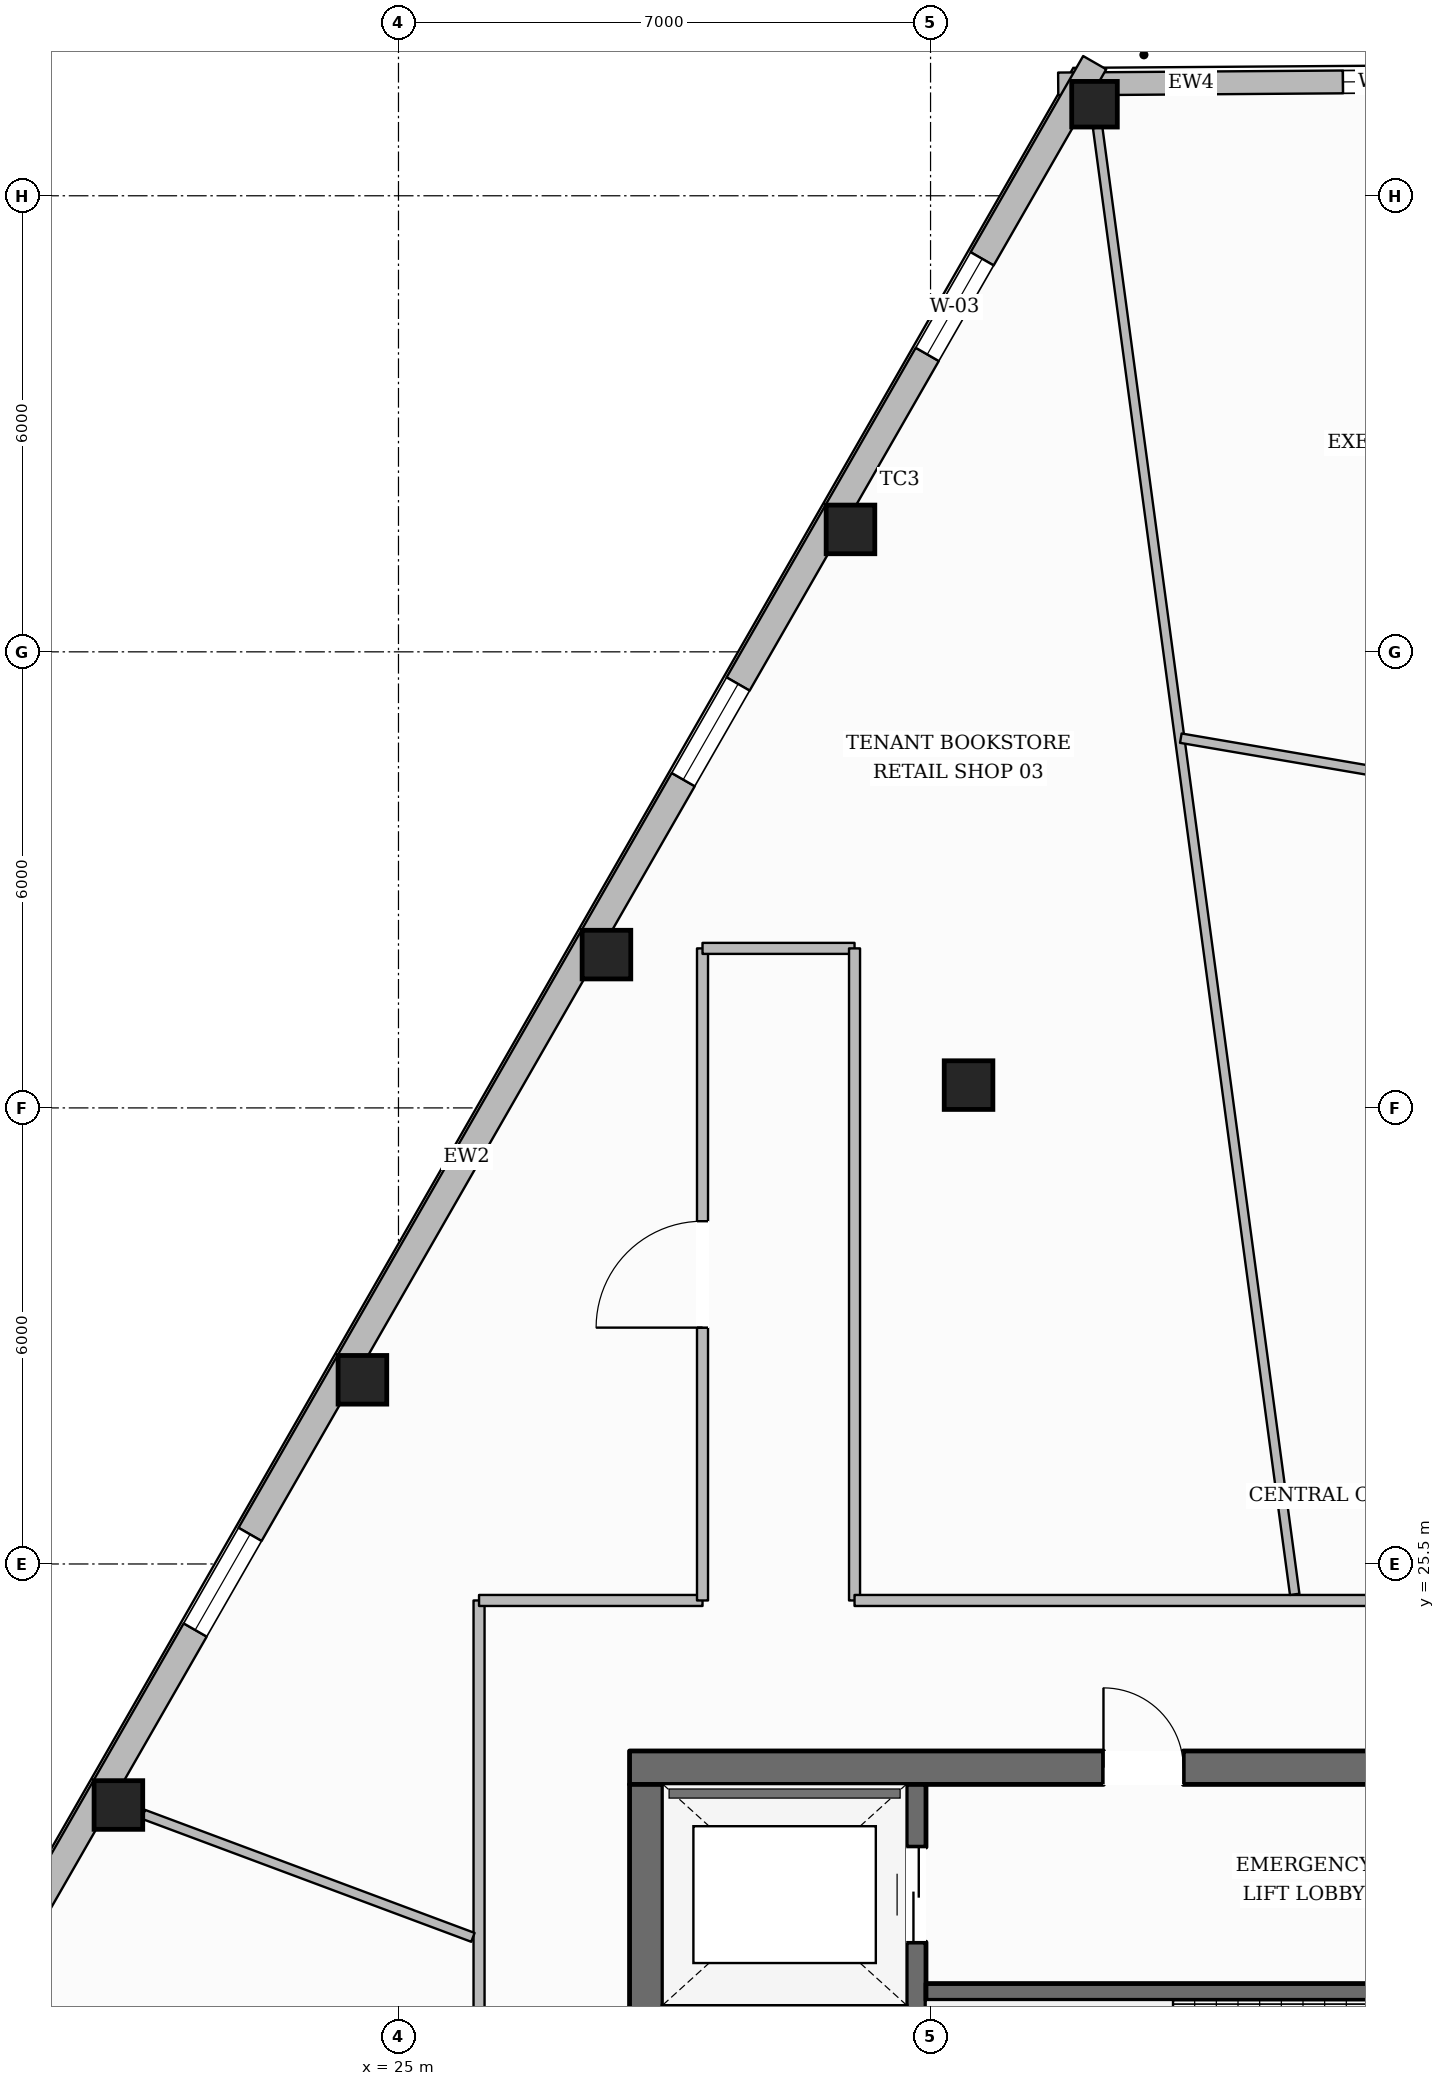
"""IFC4 building model, lengths in metres.
Left out: names, types, materials, properties, quantities, classifications, styles, units other than length and angle.
Written with IfcOpenShell. Run it as: python <this file> out.ifc"""

import sys

from ifc_helpers import new_model, si_unit, direction, frame, frame_2d, origin, origin_2d, place, context, subcontext, project, spatial, rectangle, hollow_rectangle, extrude, element, fill, save


model = new_model("IFC4")
c1 = context("Model", 3, precision=1e-05, world=origin(), true_north=direction((0.0, 1.0)))
c2 = subcontext(c1, "Body", "Model", "MODEL_VIEW")
j1 = project(units=[si_unit("LENGTHUNIT", "METRE"), si_unit("PLANEANGLEUNIT", "RADIAN")], contexts=[c1])
p1 = place(None, origin())
s1 = spatial("IfcSite", under=j1, at=p1, CompositionType="ELEMENT")
p2 = place(p1, origin())
s2 = spatial("IfcBuilding", under=s1, at=p2, CompositionType="ELEMENT")
p3 = place(p2, frame((0.0, 0.0, 226.6)))
s3 = spatial("IfcBuildingStorey", under=s2, at=p3, CompositionType="ELEMENT", Elevation=226.6)
p4 = place(p3, frame((28.04, 22.82, 0.0), z_axis=(0.0, 0.0, 1.0), x_axis=(1.0, 0.0, 0.0)))
e1 = element("IfcWall", 1, at=p4, inside=s3, PredefinedType="SOLIDWALL", context=c2, shape_type="SweptSolid", body=[
    extrude(rectangle(XDim=19.92, YDim=0.44, at=frame_2d((9.96, 0.0))), origin(), (0.0, 0.0, 1.0), 3.6),
])
p5 = place(p4, frame((6.235, 0.0, 0.0)))
e2 = element("IfcOpeningElement", 2, at=p5, cuts=e1, PredefinedType="OPENING", context=c2, shape_type="SweptSolid", body=[
    extrude(rectangle(XDim=1.05, YDim=2.15, at=frame_2d((0.525, 1.075))), frame((0.0, 0.23, 0.0), z_axis=(0.0, -1.0, 0.0), x_axis=(1.0, 0.0, 0.0)), (0.0, 0.0, 1.0), 0.46),
])
p6 = place(p4, frame((12.635, 0.0, 0.0)))
e3 = element("IfcOpeningElement", 3, at=p6, cuts=e1, PredefinedType="OPENING", context=c2, shape_type="SweptSolid", body=[
    extrude(rectangle(XDim=1.05, YDim=2.15, at=frame_2d((0.525, 1.075))), frame((0.0, 0.23, 0.0), z_axis=(0.0, -1.0, 0.0), x_axis=(1.0, 0.0, 0.0)), (0.0, 0.0, 1.0), 0.46),
])
p7 = place(p3, frame((28.26, 9.6, 0.0), z_axis=(0.0, 0.0, 1.0), x_axis=(0.0, 1.0, 0.0)))
e4 = element("IfcWall", 4, at=p7, inside=s3, PredefinedType="SOLIDWALL", context=c2, shape_type="SweptSolid", body=[
    extrude(rectangle(XDim=13.0, YDim=0.44, at=frame_2d((6.5, 0.0))), origin(), (0.0, 0.0, 1.0), 3.6),
])
p8 = place(p7, frame((0.2, 0.0, 0.0)))
e5 = element("IfcOpeningElement", 5, at=p8, cuts=e4, PredefinedType="OPENING", context=c2, shape_type="SweptSolid", body=[
    extrude(rectangle(XDim=1.1, YDim=2.15, at=frame_2d((0.55, 1.075))), frame((0.0, 0.23, 0.0), z_axis=(0.0, -1.0, 0.0), x_axis=(1.0, 0.0, 0.0)), (0.0, 0.0, 1.0), 0.46),
])
p9 = place(p7, frame((8.4, 0.0, 0.0)))
e6 = element("IfcOpeningElement", 6, at=p9, cuts=e4, PredefinedType="OPENING", context=c2, shape_type="SweptSolid", body=[
    extrude(rectangle(XDim=0.9, YDim=2.1, at=frame_2d((0.45, 1.05))), frame((0.0, 0.23, 0.0), z_axis=(0.0, -1.0, 0.0), x_axis=(1.0, 0.0, 0.0)), (0.0, 0.0, 1.0), 0.46),
])
p10 = place(p3, frame((31.81, 9.6, 0.0), z_axis=(0.0, 0.0, 1.0), x_axis=(0.0, 1.0, 0.0)))
e7 = element("IfcWall", 7, at=p10, inside=s3, PredefinedType="SHEAR", context=c2, shape_type="SweptSolid", body=[
    extrude(rectangle(XDim=13.0, YDim=0.26, at=frame_2d((6.5, 0.0))), origin(), (0.0, 0.0, 1.0), 3.6),
])
p11 = place(p10, frame((10.925, 0.0, 0.0)))
e8 = element("IfcOpeningElement", 8, at=p11, cuts=e7, PredefinedType="OPENING", context=c2, shape_type="SweptSolid", body=[
    extrude(rectangle(XDim=1.25, YDim=2.25, at=frame_2d((0.625, 1.125))), frame((0.0, 0.14, 0.0), z_axis=(0.0, -1.0, 0.0), x_axis=(1.0, 0.0, 0.0)), (0.0, 0.0, 1.0), 0.28),
])
p12 = place(p3, frame((28.48, 19.57, 0.0), z_axis=(0.0, 0.0, 1.0), x_axis=(1.0, 0.0, 0.0)))
e9 = element("IfcWall", 9, at=p12, inside=s3, PredefinedType="SHEAR", context=c2, shape_type="SweptSolid", body=[
    extrude(rectangle(XDim=3.2, YDim=0.26, at=frame_2d((1.6, 0.0))), origin(), (0.0, 0.0, 1.0), 3.6),
])
p13 = place(p3, frame((31.94, 19.87, 0.0), z_axis=(0.0, 0.0, 1.0), x_axis=(1.0, 0.0, 0.0)))
e10 = element("IfcWall", 10, at=p13, inside=s3, PredefinedType="SOLIDWALL", context=c2, shape_type="SweptSolid", body=[
    extrude(rectangle(XDim=12.12, YDim=0.22, at=frame_2d((6.06, 0.0))), origin(), (0.0, 0.0, 1.0), 3.6),
])
p14 = place(p13, frame((6.3, 0.0, 0.0)))
e11 = element("IfcOpeningElement", 11, at=p14, cuts=e10, PredefinedType="OPENING", context=c2, shape_type="SweptSolid", body=[
    extrude(rectangle(XDim=1.1, YDim=2.15, at=frame_2d((0.55, 1.075))), frame((0.0, 0.12, 0.0), z_axis=(0.0, -1.0, 0.0), x_axis=(1.0, 0.0, 0.0)), (0.0, 0.0, 1.0), 0.24),
])
p15 = place(p13, frame((8.23, 0.0, 0.0)))
e12 = element("IfcOpeningElement", 12, at=p15, cuts=e10, PredefinedType="OPENING", context=c2, shape_type="SweptSolid", body=[
    extrude(rectangle(XDim=0.9, YDim=2.1, at=frame_2d((0.45, 1.05))), frame((0.0, 0.12, 0.0), z_axis=(0.0, -1.0, 0.0), x_axis=(1.0, 0.0, 0.0)), (0.0, 0.0, 1.0), 0.24),
])
p16 = place(p13, frame((10.45, 0.0, 0.0)))
e13 = element("IfcOpeningElement", 13, at=p16, cuts=e10, PredefinedType="OPENING", context=c2, shape_type="SweptSolid", body=[
    extrude(rectangle(XDim=0.9, YDim=2.1, at=frame_2d((0.45, 1.05))), frame((0.0, 0.12, 0.0), z_axis=(0.0, -1.0, 0.0), x_axis=(1.0, 0.0, 0.0)), (0.0, 0.0, 1.0), 0.24),
])
p17 = place(p3, frame((34.157, 44.705, 0.0), z_axis=(0.0, 0.0, 1.0), x_axis=(1.0, 0.0, 0.0)))
e14 = element("IfcColumn", 14, at=p17, inside=s3, PredefinedType="COLUMN", context=c2, shape_type="SweptSolid", body=[
    extrude(hollow_rectangle(XDim=0.6, YDim=0.6, WallThickness=0.028, at=origin_2d()), origin(), (0.0, 0.0, 1.0), 3.6),
])
for number, where, z_axis, x_axis in (
    (15, (30.947, 39.111, 0.0), (0.0, 0.0, 1.0), (1.0, 0.0, 0.0)),
    (16, (27.736, 33.517, 0.0), (0.0, 0.0, 1.0), (1.0, 0.0, 0.0)),
    (17, (24.526, 27.923, 0.0), (0.0, 0.0, 1.0), (1.0, 0.0, 0.0)),
    (18, (21.315, 22.329, 0.0), (0.0, 0.0, 1.0), (1.0, 0.0, 0.0)),
    (19, (32.5, 31.8, 0.0), (0.0, 0.0, 1.0), (1.0, 0.0, 0.0)),
):
    element("IfcColumn", number, at=place(p3, frame(where, z_axis=z_axis, x_axis=x_axis)), inside=s3, PredefinedType="COLUMN", context=c2, shape_type="SweptSolid", body=[
        extrude(hollow_rectangle(XDim=0.64, YDim=0.64, WallThickness=0.028, at=origin_2d()), origin(), (0.0, 0.0, 1.0), 3.6),
    ])
p18 = place(p3, frame((33.679, 44.971, 0.0), z_axis=(0.0, 0.0, 1.0), x_axis=(0.999974684305, 0.007115528717, 0.0)))
e20 = element("IfcWall", 20, at=p18, inside=s3, PredefinedType="STANDARD", context=c2, shape_type="SweptSolid", body=[
    extrude(rectangle(XDim=8.543, YDim=0.3, at=frame_2d((4.272, 0.0))), origin(), (0.0, 0.0, 1.0), 3.132),
])
p19 = place(p18, frame((3.747, 0.0, 0.65)))
e21 = element("IfcOpeningElement", 21, at=p19, cuts=e20, PredefinedType="OPENING", context=c2, shape_type="SweptSolid", body=[
    extrude(rectangle(XDim=1.05, YDim=1.7, at=frame_2d((0.525, 0.85))), frame((0.0, 0.16, 0.0), z_axis=(0.0, -1.0, 0.0), x_axis=(1.0, 0.0, 0.0)), (0.0, 0.0, 1.0), 0.32),
])
p20 = place(p3, frame((14.425, 10.865, 0.0), z_axis=(0.0, 0.0, 1.0), x_axis=(0.497768108872, 0.867310157781, 0.0)))
e22 = element("IfcWall", 22, at=p20, inside=s3, PredefinedType="STANDARD", context=c2, shape_type="SweptSolid", body=[
    extrude(rectangle(XDim=39.647, YDim=0.35, at=frame_2d((19.823, 0.0))), origin(), (0.0, 0.0, 1.0), 3.132),
])
p21 = place(p20, frame((35.221, 0.0, 0.65)))
e23 = element("IfcOpeningElement", 23, at=p21, cuts=e22, PredefinedType="OPENING", context=c2, shape_type="SweptSolid", body=[
    extrude(rectangle(XDim=1.45, YDim=1.75, at=frame_2d((0.725, 0.875))), frame((0.0, 0.185, 0.0), z_axis=(0.0, -1.0, 0.0), x_axis=(1.0, 0.0, 0.0)), (0.0, 0.0, 1.0), 0.37),
])
p22 = place(p20, frame((28.771, 0.0, 0.65)))
e24 = element("IfcOpeningElement", 24, at=p22, cuts=e22, PredefinedType="OPENING", context=c2, shape_type="SweptSolid", body=[
    extrude(rectangle(XDim=1.45, YDim=1.75, at=frame_2d((0.725, 0.875))), frame((0.0, 0.185, 0.0), z_axis=(0.0, -1.0, 0.0), x_axis=(1.0, 0.0, 0.0)), (0.0, 0.0, 1.0), 0.37),
])
p23 = place(p20, frame((15.872, 0.0, 0.65)))
e25 = element("IfcOpeningElement", 25, at=p23, cuts=e22, PredefinedType="OPENING", context=c2, shape_type="SweptSolid", body=[
    extrude(rectangle(XDim=1.45, YDim=1.75, at=frame_2d((0.725, 0.875))), frame((0.0, 0.185, 0.0), z_axis=(0.0, -1.0, 0.0), x_axis=(1.0, 0.0, 0.0)), (0.0, 0.0, 1.0), 0.37),
])
p24 = place(p20, frame((9.423, 0.0, 0.65)))
e26 = element("IfcOpeningElement", 26, at=p24, cuts=e22, PredefinedType="OPENING", context=c2, shape_type="SweptSolid", body=[
    extrude(rectangle(XDim=1.45, YDim=1.75, at=frame_2d((0.725, 0.875))), frame((0.0, 0.185, 0.0), z_axis=(0.0, -1.0, 0.0), x_axis=(1.0, 0.0, 0.0)), (0.0, 0.0, 1.0), 0.37),
])
p25 = place(p20, frame((2.973, 0.0, 0.65)))
e27 = element("IfcOpeningElement", 27, at=p25, cuts=e22, PredefinedType="OPENING", context=c2, shape_type="SweptSolid", body=[
    extrude(rectangle(XDim=1.45, YDim=1.75, at=frame_2d((0.725, 0.875))), frame((0.0, 0.185, 0.0), z_axis=(0.0, -1.0, 0.0), x_axis=(1.0, 0.0, 0.0)), (0.0, 0.0, 1.0), 0.37),
])
p26 = place(p3, frame((26.06, 17.65, 0.0), z_axis=(0.0, 0.0, 1.0), x_axis=(0.0, 1.0, 0.0)))
e28 = element("IfcWall", 28, at=p26, inside=s3, PredefinedType="PARTITIONING", context=c2, shape_type="SweptSolid", body=[
    extrude(rectangle(XDim=7.37, YDim=0.145, at=frame_2d((3.685, 0.0))), origin(), (0.0, 0.0, 1.0), 3.339),
])
p27 = place(p3, frame((26.06, 25.02, 0.0), z_axis=(0.0, 0.0, 1.0), x_axis=(1.0, 0.0, 0.0)))
e29 = element("IfcWall", 29, at=p27, inside=s3, PredefinedType="PARTITIONING", context=c2, shape_type="SweptSolid", body=[
    extrude(rectangle(XDim=2.94, YDim=0.145, at=frame_2d((1.47, 0.0))), origin(), (0.0, 0.0, 1.0), 3.6),
])
p28 = place(p3, frame((29.0, 25.02, 0.0), z_axis=(0.0, 0.0, 1.0), x_axis=(0.0, 1.0, 0.0)))
e30 = element("IfcWall", 30, at=p28, inside=s3, PredefinedType="PARTITIONING", context=c2, shape_type="SweptSolid", body=[
    extrude(rectangle(XDim=8.579, YDim=0.145, at=frame_2d((4.289, 0.0))), origin(), (0.0, 0.0, 1.0), 3.141),
])
p29 = place(p28, frame((3.589, 0.0, 0.0)))
e31 = element("IfcOpeningElement", 31, at=p29, cuts=e30, PredefinedType="OPENING", context=c2, shape_type="SweptSolid", body=[
    extrude(rectangle(XDim=1.4, YDim=2.2, at=frame_2d((0.7, 1.1))), frame((0.0, 0.083, 0.0), z_axis=(0.0, -1.0, 0.0), x_axis=(1.0, 0.0, 0.0)), (0.0, 0.0, 1.0), 0.165),
])
p30 = place(p3, frame((29.0, 33.599, 0.0), z_axis=(0.0, 0.0, 1.0), x_axis=(1.0, 0.0, 0.0)))
e32 = element("IfcWall", 32, at=p30, inside=s3, PredefinedType="PARTITIONING", context=c2, shape_type="SweptSolid", body=[
    extrude(rectangle(XDim=2.0, YDim=0.145, at=frame_2d((1.0, 0.0))), origin(), (0.0, 0.0, 1.0), 3.6),
])
p31 = place(p3, frame((31.0, 33.599, 0.0), z_axis=(0.0, 0.0, 1.0), x_axis=(0.0, -1.0, 0.0)))
e33 = element("IfcWall", 33, at=p31, inside=s3, PredefinedType="PARTITIONING", context=c2, shape_type="SweptSolid", body=[
    extrude(rectangle(XDim=8.579, YDim=0.145, at=frame_2d((4.289, 0.0))), origin(), (0.0, 0.0, 1.0), 3.141),
])
p32 = place(p3, frame((31.0, 25.02, 0.0), z_axis=(0.0, 0.0, 1.0), x_axis=(1.0, 0.0, 0.0)))
e34 = element("IfcWall", 34, at=p32, inside=s3, PredefinedType="PARTITIONING", context=c2, shape_type="SweptSolid", body=[
    extrude(rectangle(XDim=14.0, YDim=0.145, at=frame_2d((7.0, 0.0))), origin(), (0.0, 0.0, 1.0), 3.6),
])
p33 = place(p32, frame((9.11, 0.0, 0.0)))
e35 = element("IfcOpeningElement", 35, at=p33, cuts=e34, PredefinedType="OPENING", context=c2, shape_type="SweptSolid", body=[
    extrude(rectangle(XDim=1.4, YDim=2.2, at=frame_2d((0.7, 1.1))), frame((0.0, 0.083, 0.0), z_axis=(0.0, -1.0, 0.0), x_axis=(1.0, 0.0, 0.0)), (0.0, 0.0, 1.0), 0.165),
])
p34 = place(p3, frame((36.791, 25.101, 0.0), z_axis=(0.0, 0.0, 1.0), x_axis=(-0.133147673906, 0.991096209726, 0.0)))
e36 = element("IfcWall", 36, at=p34, inside=s3, PredefinedType="PARTITIONING", context=c2, shape_type="SweptSolid", body=[
    extrude(rectangle(XDim=19.469, YDim=0.125, at=frame_2d((9.735, 0.0))), origin(), (0.0, 0.0, 1.0), 3.141),
])
p35 = place(p3, frame((25.979, 20.588, 0.0), z_axis=(0.0, 0.0, 1.0), x_axis=(-0.936837597127, 0.34976465889, 0.0)))
e37 = element("IfcWall", 37, at=p35, inside=s3, PredefinedType="PARTITIONING", context=c2, shape_type="SweptSolid", body=[
    extrude(rectangle(XDim=4.628, YDim=0.125, at=frame_2d((2.314, 0.0))), origin(), (0.0, 0.0, 1.0), 3.6),
])
p36 = place(p3, frame((47.826, 34.224, 0.0), z_axis=(0.0, 0.0, 1.0), x_axis=(-0.985736503202, 0.168296007841, 0.0)))
e38 = element("IfcWall", 38, at=p36, inside=s3, PredefinedType="PARTITIONING", context=c2, shape_type="SweptSolid", body=[
    extrude(rectangle(XDim=12.715, YDim=0.125, at=frame_2d((6.357, 0.0))), origin(), (0.0, 0.0, 1.0), 3.6),
])
p37 = place(p36, frame((5.759, 0.0, 0.0)))
e39 = element("IfcOpeningElement", 39, at=p37, cuts=e38, PredefinedType="OPENING", context=c2, shape_type="SweptSolid", body=[
    extrude(rectangle(XDim=0.98, YDim=2.15, at=frame_2d((0.49, 1.075))), frame((0.0, 0.073, 0.0), z_axis=(0.0, -1.0, 0.0), x_axis=(1.0, 0.0, 0.0)), (0.0, 0.0, 1.0), 0.145),
])
p38 = place(p21, origin())
e40 = element("IfcWindow", 40, at=p38, inside=s3, PartitioningType="SINGLE_PANEL", PredefinedType="WINDOW", context=c2, shape_type="SweptSolid", body=[
    extrude(rectangle(XDim=1.45, YDim=1.75, at=frame_2d((0.725, 0.875))), frame((0.0, 0.03, 0.0), z_axis=(0.0, -1.0, 0.0), x_axis=(1.0, 0.0, 0.0)), (0.0, 0.0, 1.0), 0.06),
])
fill(e23, e40)
p39 = place(p22, origin())
e41 = element("IfcWindow", 41, at=p39, inside=s3, PartitioningType="SINGLE_PANEL", PredefinedType="WINDOW", context=c2, shape_type="SweptSolid", body=[
    extrude(rectangle(XDim=1.45, YDim=1.75, at=frame_2d((0.725, 0.875))), frame((0.0, 0.03, 0.0), z_axis=(0.0, -1.0, 0.0), x_axis=(1.0, 0.0, 0.0)), (0.0, 0.0, 1.0), 0.06),
])
fill(e24, e41)
p40 = place(p23, origin())
e42 = element("IfcWindow", 42, at=p40, inside=s3, PartitioningType="SINGLE_PANEL", PredefinedType="WINDOW", context=c2, shape_type="SweptSolid", body=[
    extrude(rectangle(XDim=1.45, YDim=1.75, at=frame_2d((0.725, 0.875))), frame((0.0, 0.03, 0.0), z_axis=(0.0, -1.0, 0.0), x_axis=(1.0, 0.0, 0.0)), (0.0, 0.0, 1.0), 0.06),
])
fill(e25, e42)
p41 = place(p19, origin())
e43 = element("IfcWindow", 43, at=p41, inside=s3, PartitioningType="SINGLE_PANEL", PredefinedType="WINDOW", context=c2, shape_type="SweptSolid", body=[
    extrude(rectangle(XDim=1.05, YDim=1.7, at=frame_2d((0.525, 0.85))), frame((0.0, 0.03, 0.0), z_axis=(0.0, -1.0, 0.0), x_axis=(1.0, 0.0, 0.0)), (0.0, 0.0, 1.0), 0.06),
])
fill(e21, e43)
p42 = place(p5, origin())
e44 = element("IfcDoor", 44, at=p42, inside=s3, OperationType="SINGLE_SWING_LEFT", PredefinedType="DOOR", context=c2, shape_type="SweptSolid", body=[
    extrude(rectangle(XDim=1.05, YDim=2.15, at=frame_2d((0.525, 1.075))), frame((0.0, 0.025, 0.0), z_axis=(0.0, -1.0, 0.0), x_axis=(1.0, 0.0, 0.0)), (0.0, 0.0, 1.0), 0.05),
])
fill(e2, e44)
p43 = place(p11, origin())
e45 = element("IfcDoor", 45, at=p43, inside=s3, OperationType="DOUBLE_DOOR_SLIDING", PredefinedType="DOOR", context=c2, shape_type="SweptSolid", body=[
    extrude(rectangle(XDim=1.25, YDim=2.25, at=frame_2d((0.625, 1.125))), frame((0.0, 0.025, 0.0), z_axis=(0.0, -1.0, 0.0), x_axis=(1.0, 0.0, 0.0)), (0.0, 0.0, 1.0), 0.05),
])
fill(e8, e45)
p44 = place(p29, origin())
e46 = element("IfcDoor", 46, at=p44, inside=s3, OperationType="SINGLE_SWING_LEFT", PredefinedType="DOOR", context=c2, shape_type="SweptSolid", body=[
    extrude(rectangle(XDim=1.4, YDim=2.2, at=frame_2d((0.7, 1.1))), frame((0.0, 0.025, 0.0), z_axis=(0.0, -1.0, 0.0), x_axis=(1.0, 0.0, 0.0)), (0.0, 0.0, 1.0), 0.05),
])
fill(e31, e46)
save(model, sys.argv[1])
